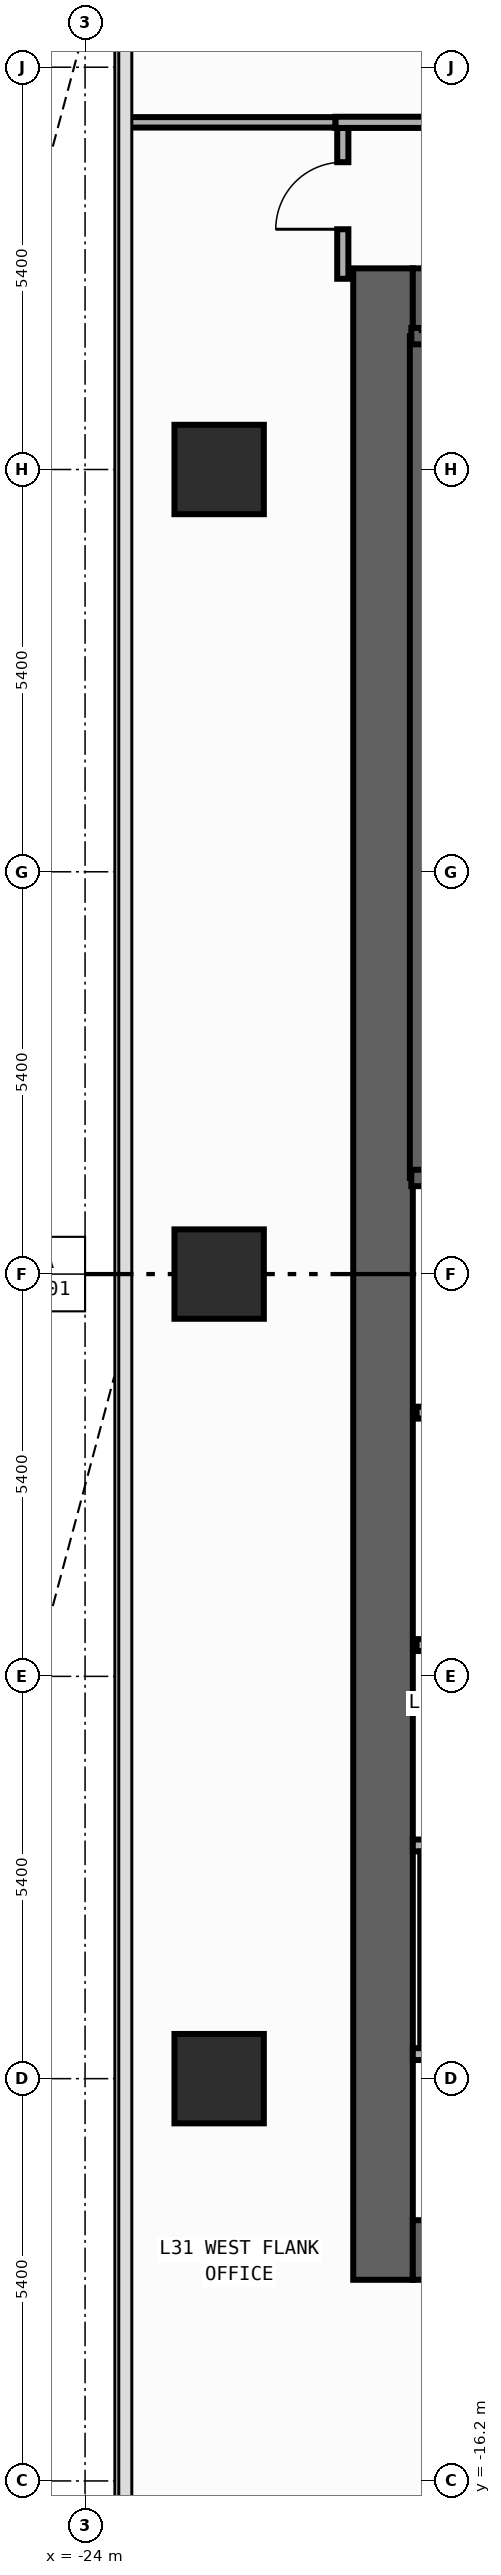
"""IFC4 building model, lengths in metres.
Left out: names, types, materials, properties, quantities, classifications, styles, units other than length and angle.
Written with IfcOpenShell. Run it as: python <this file> out.ifc"""

import sys

from ifc_helpers import new_model, si_unit, direction, frame, frame_2d, origin, origin_2d, place, context, subcontext, project, spatial, rectangle, extrude, element, fill, save


model = new_model("IFC4")
c1 = context("Model", 3, precision=1e-05, world=origin(), true_north=direction((0.0, 1.0)))
c2 = subcontext(c1, "Body", "Model", "MODEL_VIEW")
j1 = project(units=[si_unit("LENGTHUNIT", "METRE"), si_unit("PLANEANGLEUNIT", "RADIAN")], contexts=[c1])
p1 = place(None, origin())
s1 = spatial("IfcSite", under=j1, at=p1, CompositionType="ELEMENT")
p2 = place(p1, origin())
s2 = spatial("IfcBuilding", under=s1, at=p2, CompositionType="ELEMENT")
p3 = place(p2, frame((0.0, 0.0, 135.2)))
s3 = spatial("IfcBuildingStorey", under=s2, at=p3, CompositionType="ELEMENT", Elevation=135.2)
p4 = place(p3, frame((-20.0, -13.5, 0.0), z_axis=(0.0, 0.0, 1.0), x_axis=(0.0, 1.0, 0.0)))
e1 = element("IfcWall", 1, at=p4, inside=s3, PredefinedType="SHEAR", context=c2, shape_type="SweptSolid", body=[
    extrude(rectangle(XDim=27.0, YDim=0.8, at=frame_2d((13.5, 0.0))), origin(), (0.0, 0.0, 1.0), 3.94),
])
for number, where, z_axis, x_axis in (
    (2, (-19.6, -13.1, 0.0), (0.0, 0.0, 1.0), (1.0, 0.0, 0.0)),
    (3, (-19.6, 13.1, 0.0), (0.0, 0.0, 1.0), (1.0, 0.0, 0.0)),
):
    element("IfcWall", number, at=place(p3, frame(where, z_axis=z_axis, x_axis=x_axis)), inside=s3, PredefinedType="SHEAR", context=c2, shape_type="SweptSolid", body=[
        extrude(rectangle(XDim=6.8, YDim=0.8, at=frame_2d((3.4, 0.0))), origin(), (0.0, 0.0, 1.0), 3.94),
    ])
p5 = place(p3, frame((-19.53, 1.29, 0.0), z_axis=(0.0, 0.0, 1.0), x_axis=(0.0, 1.0, 0.0)))
e4 = element("IfcWall", 4, at=p5, inside=s3, PredefinedType="SHEAR", context=c2, shape_type="SweptSolid", body=[
    extrude(rectangle(XDim=11.3, YDim=0.22, at=frame_2d((5.65, 0.0))), origin(), (0.0, 0.0, 1.0), 3.94),
])
p6 = place(p3, frame((-19.62, 12.59, 0.0), z_axis=(0.0, 0.0, 1.0), x_axis=(1.0, 0.0, 0.0)))
e5 = element("IfcWall", 5, at=p6, inside=s3, PredefinedType="SHEAR", context=c2, shape_type="SweptSolid", body=[
    extrude(rectangle(XDim=3.915, YDim=0.22, at=frame_2d((1.958, 0.0))), origin(), (0.0, 0.0, 1.0), 3.94),
])
p7 = place(p3, frame((-19.62, 1.29, 0.0), z_axis=(0.0, 0.0, 1.0), x_axis=(1.0, 0.0, 0.0)))
e6 = element("IfcWall", 6, at=p7, inside=s3, PredefinedType="SHEAR", context=c2, shape_type="SweptSolid", body=[
    extrude(rectangle(XDim=3.915, YDim=0.22, at=frame_2d((1.958, 0.0))), origin(), (0.0, 0.0, 1.0), 3.94),
])
p8 = place(p7, frame((1.08, 0.0, 0.0)))
e7 = element("IfcOpeningElement", 7, at=p8, cuts=e6, PredefinedType="OPENING", context=c2, shape_type="SweptSolid", body=[
    extrude(rectangle(XDim=1.1, YDim=2.2, at=frame_2d((0.55, 1.1))), frame((0.0, 0.12, 0.0), z_axis=(0.0, -1.0, 0.0), x_axis=(1.0, 0.0, 0.0)), (0.0, 0.0, 1.0), 0.24),
])
for number, where, z_axis, x_axis in (
    (8, (-22.2, -10.8, 0.0), (0.0, 0.0, 1.0), (1.0, 0.0, 0.0)),
    (9, (-22.2, 0.0, 0.0), (0.0, 0.0, 1.0), (1.0, 0.0, 0.0)),
    (10, (-22.2, 10.8, 0.0), (0.0, 0.0, 1.0), (1.0, 0.0, 0.0)),
):
    element("IfcColumn", number, at=place(p3, frame(where, z_axis=z_axis, x_axis=x_axis)), inside=s3, PredefinedType="COLUMN", context=c2, shape_type="SweptSolid", body=[
        extrude(rectangle(XDim=1.2, YDim=1.2, at=origin_2d()), origin(), (0.0, 0.0, 1.0), 4.2),
    ])
p9 = place(p3, frame((-19.55, -1.86, 0.0), z_axis=(0.0, 0.0, 1.0), x_axis=(1.0, 0.0, 0.0)))
e11 = element("IfcWall", 11, at=p9, inside=s3, PredefinedType="STANDARD", context=c2, shape_type="SweptSolid", body=[
    extrude(rectangle(XDim=3.8, YDim=0.16, at=frame_2d((1.9, 0.0))), origin(), (0.0, 0.0, 1.0), 3.94),
])
p10 = place(p9, frame((1.18, 0.0, 0.0)))
e12 = element("IfcOpeningElement", 12, at=p10, cuts=e11, PredefinedType="OPENING", context=c2, shape_type="SweptSolid", body=[
    extrude(rectangle(XDim=1.15, YDim=2.2, at=frame_2d((0.575, 1.1))), frame((0.0, 0.09, 0.0), z_axis=(0.0, -1.0, 0.0), x_axis=(1.0, 0.0, 0.0)), (0.0, 0.0, 1.0), 0.18),
])
p11 = place(p3, frame((-19.55, -4.98, 0.0), z_axis=(0.0, 0.0, 1.0), x_axis=(1.0, 0.0, 0.0)))
e13 = element("IfcWall", 13, at=p11, inside=s3, PredefinedType="STANDARD", context=c2, shape_type="SweptSolid", body=[
    extrude(rectangle(XDim=3.8, YDim=0.16, at=frame_2d((1.9, 0.0))), origin(), (0.0, 0.0, 1.0), 3.94),
])
for number, where, z_axis, x_axis in (
    (14, (-19.6, -10.47, 0.0), (0.0, 0.0, 1.0), (1.0, 0.0, 0.0)),
    (15, (-19.6, -7.67, 0.0), (0.0, 0.0, 1.0), (1.0, 0.0, 0.0)),
):
    element("IfcWall", number, at=place(p3, frame(where, z_axis=z_axis, x_axis=x_axis)), inside=s3, PredefinedType="PARTITIONING", context=c2, shape_type="SweptSolid", body=[
        extrude(rectangle(XDim=2.29, YDim=0.16, at=frame_2d((1.145, 0.0))), origin(), (0.0, 0.0, 1.0), 3.94),
    ])
p12 = place(p3, frame((-20.54, 13.36, 0.0), z_axis=(0.0, 0.0, 1.0), x_axis=(0.0, 1.0, 0.0)))
e16 = element("IfcWall", 16, at=p12, inside=s3, PredefinedType="PARTITIONING", context=c2, shape_type="SweptSolid", body=[
    extrude(rectangle(XDim=2.025, YDim=0.15, at=frame_2d((1.012, 0.0))), origin(), (0.0, 0.0, 1.0), 3.94),
])
p13 = place(p12, frame((0.665, 0.0, 0.0)))
e17 = element("IfcOpeningElement", 17, at=p13, cuts=e16, PredefinedType="OPENING", context=c2, shape_type="SweptSolid", body=[
    extrude(rectangle(XDim=0.9, YDim=2.15, at=frame_2d((0.45, 1.075))), frame((0.0, 0.085, 0.0), z_axis=(0.0, -1.0, 0.0), x_axis=(1.0, 0.0, 0.0)), (0.0, 0.0, 1.0), 0.17),
])
p14 = place(p3, frame((-20.64, 15.46, 0.0), z_axis=(0.0, 0.0, 1.0), x_axis=(1.0, 0.0, 0.0)))
e18 = element("IfcWall", 18, at=p14, inside=s3, PredefinedType="PARTITIONING", context=c2, shape_type="SweptSolid", body=[
    extrude(rectangle(XDim=5.408, YDim=0.15, at=frame_2d((2.704, 0.0))), origin(), (0.0, 0.0, 1.0), 3.94),
])
p15 = place(p14, frame((2.781, 0.0, 0.0)))
e19 = element("IfcOpeningElement", 19, at=p15, cuts=e18, PredefinedType="OPENING", context=c2, shape_type="SweptSolid", body=[
    extrude(rectangle(XDim=0.9, YDim=2.15, at=frame_2d((0.45, 1.075))), frame((0.0, 0.085, 0.0), z_axis=(0.0, -1.0, 0.0), x_axis=(1.0, 0.0, 0.0)), (0.0, 0.0, 1.0), 0.17),
])
p16 = place(p3, frame((-23.455, 15.46, 0.0), z_axis=(0.0, 0.0, 1.0), x_axis=(1.0, 0.0, 0.0)))
e20 = element("IfcWall", 20, at=p16, inside=s3, PredefinedType="PARTITIONING", context=c2, shape_type="SweptSolid", body=[
    extrude(rectangle(XDim=2.815, YDim=0.14, at=frame_2d((1.408, 0.0))), origin(), (0.0, 0.0, 1.0), 3.94),
])
p17 = place(p3, frame((-19.45, -10.39, 0.0), z_axis=(0.0, 0.0, 1.0), x_axis=(0.0, 1.0, 0.0)))
e21 = element("IfcWall", 21, at=p17, inside=s3, PredefinedType="PARTITIONING", context=c2, shape_type="SweptSolid", body=[
    extrude(rectangle(XDim=2.64, YDim=0.1, at=frame_2d((1.32, 0.0))), origin(), (0.0, 0.0, 1.0), 3.94),
])
p18 = place(p13, origin())
e22 = element("IfcDoor", 22, at=p18, inside=s3, OperationType="SINGLE_SWING_LEFT", PredefinedType="DOOR", context=c2, shape_type="SweptSolid", body=[
    extrude(rectangle(XDim=0.9, YDim=2.15, at=frame_2d((0.45, 1.075))), frame((0.0, 0.025, 0.0), z_axis=(0.0, -1.0, 0.0), x_axis=(1.0, 0.0, 0.0)), (0.0, 0.0, 1.0), 0.05),
])
fill(e17, e22)
save(model, sys.argv[1])
